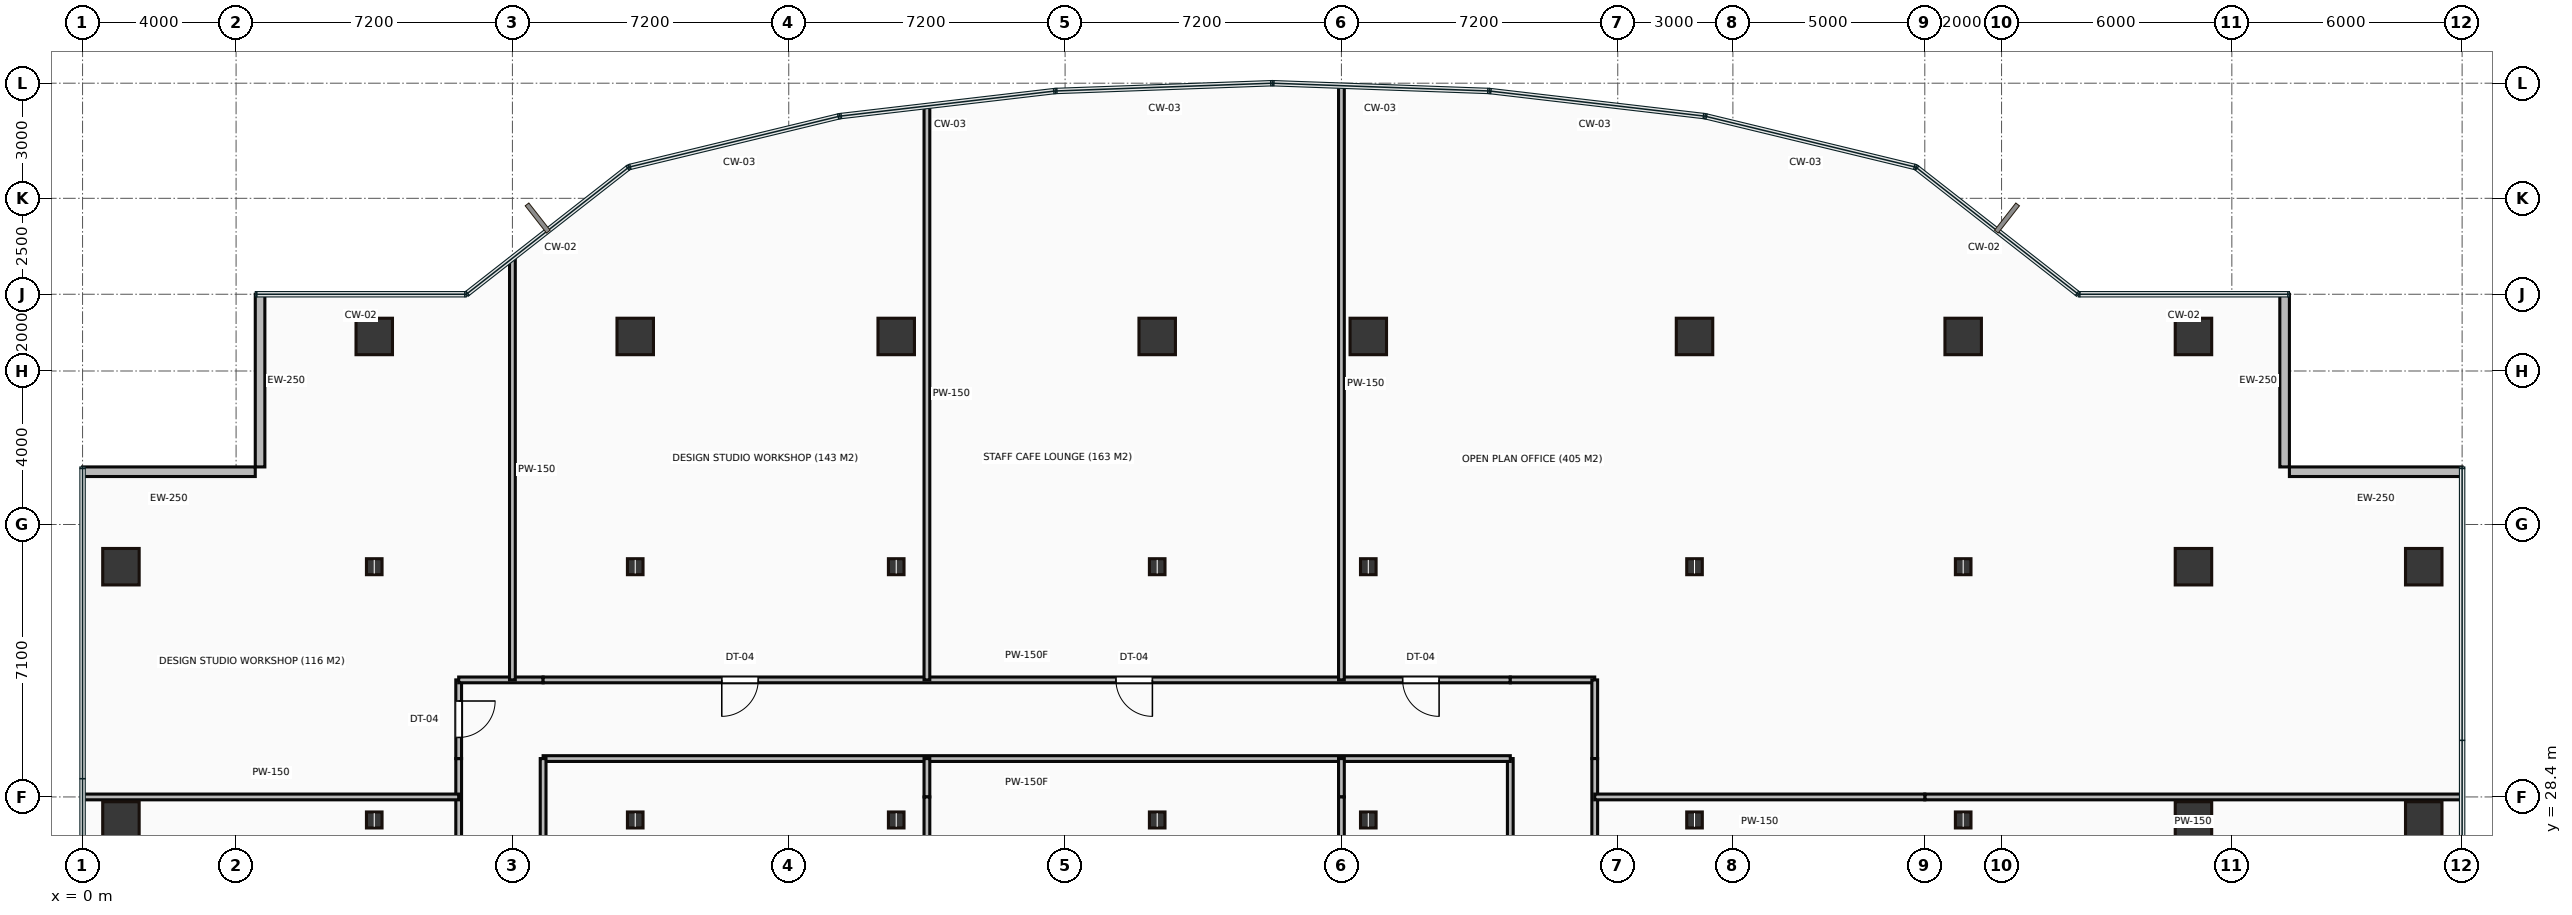
"""IFC4 building model, lengths in metres.
Left out: names, types, materials, properties, quantities, classifications, styles, units other than length and angle.
Written with IfcOpenShell. Run it as: python <this file> out.ifc"""

import sys

from ifc_helpers import new_model, si_unit, direction, frame, frame_2d, origin, origin_2d, place, context, subcontext, project, spatial, rectangle, hollow_rectangle, i_section, extrude, source, transform, mapped, element, fill, save


model = new_model("IFC4")
c1 = context("Model", 3, precision=1e-05, world=origin(), true_north=direction((0.0, 1.0)))
c2 = subcontext(c1, "Body", "Model", "MODEL_VIEW")
j1 = project(units=[si_unit("LENGTHUNIT", "METRE"), si_unit("PLANEANGLEUNIT", "RADIAN")], contexts=[c1])
p1 = place(None, origin())
s1 = spatial("IfcSite", under=j1, at=p1, CompositionType="ELEMENT")
p2 = place(p1, origin())
s2 = spatial("IfcBuilding", under=s1, at=p2, CompositionType="ELEMENT")
p3 = place(p2, frame((0.0, 0.0, 54.4)))
s3 = spatial("IfcBuildingStorey", under=s2, at=p3, CompositionType="ELEMENT", Elevation=54.4)
m1 = source(origin(), c2, "Body", "SweptSolid", [
    extrude(hollow_rectangle(XDim=0.95, YDim=0.95, WallThickness=0.045, at=origin_2d()), origin(), (0.0, 0.0, 1.0), 3.65),
])
for number, where, z_axis, x_axis in (
    (1, (1.0, 27.8, 0.0), (0.0, 0.0, 1.0), (1.0, 0.0, 0.0)),
    (2, (1.0, 34.4, 0.0), (0.0, 0.0, 1.0), (1.0, 0.0, 0.0)),
):
    element("IfcColumn", number, at=place(p3, frame(where, z_axis=z_axis, x_axis=x_axis)), inside=s3, PredefinedType="COLUMN", context=c2, shape_type="MappedRepresentation", body=[
        mapped(m1, transform((0.0, 0.0, 0.0))),
    ])
m2 = source(origin(), c2, "Body", "SweptSolid", [
    extrude(i_section(OverallWidth=0.406, OverallDepth=0.416, WebThickness=0.03, FlangeThickness=0.048, at=origin_2d()), origin(), (0.0, 0.0, 1.0), 3.65),
])
for number, where, z_axis, x_axis in (
    (3, (7.6, 27.8, 0.0), (0.0, 0.0, 1.0), (1.0, 0.0, 0.0)),
    (4, (7.6, 34.4, 0.0), (0.0, 0.0, 1.0), (1.0, 0.0, 0.0)),
):
    element("IfcColumn", number, at=place(p3, frame(where, z_axis=z_axis, x_axis=x_axis)), inside=s3, PredefinedType="COLUMN", context=c2, shape_type="MappedRepresentation", body=[
        mapped(m2, transform((0.0, 0.0, 0.0))),
    ])
p4 = place(p3, frame((7.6, 40.4, 0.0), z_axis=(0.0, 0.0, 1.0), x_axis=(1.0, 0.0, 0.0)))
e5 = element("IfcColumn", 5, at=p4, inside=s3, PredefinedType="COLUMN", context=c2, shape_type="MappedRepresentation", body=[
    mapped(m1, transform((0.0, 0.0, 0.0))),
])
for number, where, z_axis, x_axis in (
    (6, (14.4, 27.8, 0.0), (0.0, 0.0, 1.0), (1.0, 0.0, 0.0)),
    (7, (14.4, 34.4, 0.0), (0.0, 0.0, 1.0), (1.0, 0.0, 0.0)),
):
    element("IfcColumn", number, at=place(p3, frame(where, z_axis=z_axis, x_axis=x_axis)), inside=s3, PredefinedType="COLUMN", context=c2, shape_type="MappedRepresentation", body=[
        mapped(m2, transform((0.0, 0.0, 0.0))),
    ])
p5 = place(p3, frame((14.4, 40.4, 0.0), z_axis=(0.0, 0.0, 1.0), x_axis=(1.0, 0.0, 0.0)))
e8 = element("IfcColumn", 8, at=p5, inside=s3, PredefinedType="COLUMN", context=c2, shape_type="MappedRepresentation", body=[
    mapped(m1, transform((0.0, 0.0, 0.0))),
])
for number, where, z_axis, x_axis in (
    (9, (21.2, 27.8, 0.0), (0.0, 0.0, 1.0), (1.0, 0.0, 0.0)),
    (10, (21.2, 34.4, 0.0), (0.0, 0.0, 1.0), (1.0, 0.0, 0.0)),
):
    element("IfcColumn", number, at=place(p3, frame(where, z_axis=z_axis, x_axis=x_axis)), inside=s3, PredefinedType="COLUMN", context=c2, shape_type="MappedRepresentation", body=[
        mapped(m2, transform((0.0, 0.0, 0.0))),
    ])
p6 = place(p3, frame((21.2, 40.4, 0.0), z_axis=(0.0, 0.0, 1.0), x_axis=(1.0, 0.0, 0.0)))
e11 = element("IfcColumn", 11, at=p6, inside=s3, PredefinedType="COLUMN", context=c2, shape_type="MappedRepresentation", body=[
    mapped(m1, transform((0.0, 0.0, 0.0))),
])
for number, where, z_axis, x_axis in (
    (12, (28.0, 27.8, 0.0), (0.0, 0.0, 1.0), (1.0, 0.0, 0.0)),
    (13, (28.0, 34.4, 0.0), (0.0, 0.0, 1.0), (1.0, 0.0, 0.0)),
):
    element("IfcColumn", number, at=place(p3, frame(where, z_axis=z_axis, x_axis=x_axis)), inside=s3, PredefinedType="COLUMN", context=c2, shape_type="MappedRepresentation", body=[
        mapped(m2, transform((0.0, 0.0, 0.0))),
    ])
p7 = place(p3, frame((28.0, 40.4, 0.0), z_axis=(0.0, 0.0, 1.0), x_axis=(1.0, 0.0, 0.0)))
e14 = element("IfcColumn", 14, at=p7, inside=s3, PredefinedType="COLUMN", context=c2, shape_type="MappedRepresentation", body=[
    mapped(m1, transform((0.0, 0.0, 0.0))),
])
for number, where, z_axis, x_axis in (
    (15, (33.5, 27.8, 0.0), (0.0, 0.0, 1.0), (1.0, 0.0, 0.0)),
    (16, (33.5, 34.4, 0.0), (0.0, 0.0, 1.0), (1.0, 0.0, 0.0)),
):
    element("IfcColumn", number, at=place(p3, frame(where, z_axis=z_axis, x_axis=x_axis)), inside=s3, PredefinedType="COLUMN", context=c2, shape_type="MappedRepresentation", body=[
        mapped(m2, transform((0.0, 0.0, 0.0))),
    ])
p8 = place(p3, frame((33.5, 40.4, 0.0), z_axis=(0.0, 0.0, 1.0), x_axis=(1.0, 0.0, 0.0)))
e17 = element("IfcColumn", 17, at=p8, inside=s3, PredefinedType="COLUMN", context=c2, shape_type="MappedRepresentation", body=[
    mapped(m1, transform((0.0, 0.0, 0.0))),
])
for number, where, z_axis, x_axis in (
    (18, (42.0, 27.8, 0.0), (0.0, 0.0, 1.0), (1.0, 0.0, 0.0)),
    (19, (42.0, 34.4, 0.0), (0.0, 0.0, 1.0), (1.0, 0.0, 0.0)),
):
    element("IfcColumn", number, at=place(p3, frame(where, z_axis=z_axis, x_axis=x_axis)), inside=s3, PredefinedType="COLUMN", context=c2, shape_type="MappedRepresentation", body=[
        mapped(m2, transform((0.0, 0.0, 0.0))),
    ])
p9 = place(p3, frame((42.0, 40.4, 0.0), z_axis=(0.0, 0.0, 1.0), x_axis=(1.0, 0.0, 0.0)))
e20 = element("IfcColumn", 20, at=p9, inside=s3, PredefinedType="COLUMN", context=c2, shape_type="MappedRepresentation", body=[
    mapped(m1, transform((0.0, 0.0, 0.0))),
])
for number, where, z_axis, x_axis in (
    (21, (49.0, 27.8, 0.0), (0.0, 0.0, 1.0), (1.0, 0.0, 0.0)),
    (22, (49.0, 34.4, 0.0), (0.0, 0.0, 1.0), (1.0, 0.0, 0.0)),
):
    element("IfcColumn", number, at=place(p3, frame(where, z_axis=z_axis, x_axis=x_axis)), inside=s3, PredefinedType="COLUMN", context=c2, shape_type="MappedRepresentation", body=[
        mapped(m2, transform((0.0, 0.0, 0.0))),
    ])
for number, where, z_axis, x_axis in (
    (23, (49.0, 40.4, 0.0), (0.0, 0.0, 1.0), (1.0, 0.0, 0.0)),
    (24, (55.0, 27.8, 0.0), (0.0, 0.0, 1.0), (1.0, 0.0, 0.0)),
    (25, (55.0, 34.4, 0.0), (0.0, 0.0, 1.0), (1.0, 0.0, 0.0)),
    (26, (55.0, 40.4, 0.0), (0.0, 0.0, 1.0), (1.0, 0.0, 0.0)),
    (27, (61.0, 27.8, 0.0), (0.0, 0.0, 1.0), (1.0, 0.0, 0.0)),
    (28, (61.0, 34.4, 0.0), (0.0, 0.0, 1.0), (1.0, 0.0, 0.0)),
):
    element("IfcColumn", number, at=place(p3, frame(where, z_axis=z_axis, x_axis=x_axis)), inside=s3, PredefinedType="COLUMN", context=c2, shape_type="MappedRepresentation", body=[
        mapped(m1, transform((0.0, 0.0, 0.0))),
    ])
m3 = source(origin(), c2, "Body", "SweptSolid", [
    extrude(rectangle(XDim=4.5, YDim=0.25, at=frame_2d((2.25, 0.0))), origin(), (0.0, 0.0, 1.0), 3.4),
])
for number, where, z_axis, x_axis in (
    (29, (62.0, 36.875, 0.0), (0.0, 0.0, 1.0), (-1.0, 0.0, 0.0)),
    (30, (57.375, 37.0, 0.0), (0.0, 0.0, 1.0), (0.0, 1.0, 0.0)),
    (31, (4.625, 41.5, 0.0), (0.0, 0.0, 1.0), (0.0, -1.0, 0.0)),
    (32, (4.5, 36.875, 0.0), (0.0, 0.0, 1.0), (-1.0, 0.0, 0.0)),
):
    element("IfcWall", number, at=place(p3, frame(where, z_axis=z_axis, x_axis=x_axis)), inside=s3, PredefinedType="STANDARD", context=c2, shape_type="MappedRepresentation", body=[
        mapped(m3, transform((0.0, 0.0, 0.0))),
    ])
m4 = source(origin(), c2, "Body", "SweptSolid", [
    extrude(rectangle(XDim=13.15, YDim=0.15, at=frame_2d((6.575, 0.0))), origin(), (0.0, 0.0, 1.0), 3.4),
])
p10 = place(p3, frame((9.8, 16.25, 0.0), z_axis=(0.0, 0.0, 1.0), x_axis=(0.0, 1.0, 0.0)))
e33 = element("IfcWall", 33, at=p10, inside=s3, PredefinedType="PARTITIONING", context=c2, shape_type="MappedRepresentation", body=[
    mapped(m4, transform((0.0, 0.0, 0.0))),
])
p11 = place(p10, frame((5.73, 0.0, 0.0)))
e34 = element("IfcOpeningElement", 34, at=p11, cuts=e33, PredefinedType="OPENING", context=c2, shape_type="SweptSolid", body=[
    extrude(rectangle(XDim=0.95, YDim=2.15, at=frame_2d((0.475, 1.075))), frame((0.0, 0.085, 0.0), z_axis=(0.0, -1.0, 0.0), x_axis=(1.0, 0.0, 0.0)), (0.0, 0.0, 1.0), 0.17),
])
m5 = source(origin(), c2, "Body", "SweptSolid", [
    extrude(rectangle(XDim=2.05, YDim=0.15, at=frame_2d((1.025, 0.0))), origin(), (0.0, 0.0, 1.0), 3.4),
])
p12 = place(p3, frame((9.8, 29.4, 0.0), z_axis=(0.0, 0.0, 1.0), x_axis=(0.0, 1.0, 0.0)))
e35 = element("IfcWall", 35, at=p12, inside=s3, PredefinedType="PARTITIONING", context=c2, shape_type="MappedRepresentation", body=[
    mapped(m5, transform((0.0, 0.0, 0.0))),
])
p13 = place(p12, frame((0.55, 0.0, 0.0)))
e36 = element("IfcOpeningElement", 36, at=p13, cuts=e35, PredefinedType="OPENING", context=c2, shape_type="SweptSolid", body=[
    extrude(rectangle(XDim=0.95, YDim=2.15, at=frame_2d((0.475, 1.075))), frame((0.0, 0.085, 0.0), z_axis=(0.0, -1.0, 0.0), x_axis=(1.0, 0.0, 0.0)), (0.0, 0.0, 1.0), 0.17),
])
m6 = source(origin(), c2, "Body", "SweptSolid", [
    extrude(rectangle(XDim=2.2, YDim=0.15, at=frame_2d((1.1, 0.0))), origin(), (0.0, 0.0, 1.0), 3.4),
])
p14 = place(p3, frame((9.8, 31.45, 0.0), z_axis=(0.0, 0.0, 1.0), x_axis=(1.0, 0.0, 0.0)))
e37 = element("IfcWall", 37, at=p14, inside=s3, PredefinedType="PARTITIONING", context=c2, shape_type="MappedRepresentation", body=[
    mapped(m6, transform((0.0, 0.0, 0.0))),
])
m7 = source(origin(), c2, "Body", "SweptSolid", [
    extrude(rectangle(XDim=25.2, YDim=0.15, at=frame_2d((12.6, 0.0))), origin(), (0.0, 0.0, 1.0), 3.4),
])
p15 = place(p3, frame((12.0, 31.45, 0.0), z_axis=(0.0, 0.0, 1.0), x_axis=(1.0, 0.0, 0.0)))
e38 = element("IfcWall", 38, at=p15, inside=s3, PredefinedType="PARTITIONING", context=c2, shape_type="MappedRepresentation", body=[
    mapped(m7, transform((0.0, 0.0, 0.0))),
])
p16 = place(p15, frame((4.655, 0.0, 0.0)))
e39 = element("IfcOpeningElement", 39, at=p16, cuts=e38, PredefinedType="OPENING", context=c2, shape_type="SweptSolid", body=[
    extrude(rectangle(XDim=0.95, YDim=2.15, at=frame_2d((0.475, 1.075))), frame((0.0, 0.085, 0.0), z_axis=(0.0, -1.0, 0.0), x_axis=(1.0, 0.0, 0.0)), (0.0, 0.0, 1.0), 0.17),
])
p17 = place(p15, frame((14.925, 0.0, 0.0)))
e40 = element("IfcOpeningElement", 40, at=p17, cuts=e38, PredefinedType="OPENING", context=c2, shape_type="SweptSolid", body=[
    extrude(rectangle(XDim=0.95, YDim=2.15, at=frame_2d((0.475, 1.075))), frame((0.0, 0.085, 0.0), z_axis=(0.0, -1.0, 0.0), x_axis=(1.0, 0.0, 0.0)), (0.0, 0.0, 1.0), 0.17),
])
p18 = place(p15, frame((22.395, 0.0, 0.0)))
e41 = element("IfcOpeningElement", 41, at=p18, cuts=e38, PredefinedType="OPENING", context=c2, shape_type="SweptSolid", body=[
    extrude(rectangle(XDim=0.95, YDim=2.15, at=frame_2d((0.475, 1.075))), frame((0.0, 0.085, 0.0), z_axis=(0.0, -1.0, 0.0), x_axis=(1.0, 0.0, 0.0)), (0.0, 0.0, 1.0), 0.17),
])
p19 = place(p3, frame((37.2, 31.45, 0.0), z_axis=(0.0, 0.0, 1.0), x_axis=(1.0, 0.0, 0.0)))
e42 = element("IfcWall", 42, at=p19, inside=s3, PredefinedType="PARTITIONING", context=c2, shape_type="MappedRepresentation", body=[
    mapped(m6, transform((0.0, 0.0, 0.0))),
])
p20 = place(p3, frame((39.4, 31.45, 0.0), z_axis=(0.0, 0.0, 1.0), x_axis=(0.0, -1.0, 0.0)))
e43 = element("IfcWall", 43, at=p20, inside=s3, PredefinedType="PARTITIONING", context=c2, shape_type="MappedRepresentation", body=[
    mapped(m5, transform((0.0, 0.0, 0.0))),
])
p21 = place(p3, frame((39.4, 29.4, 0.0), z_axis=(0.0, 0.0, 1.0), x_axis=(0.0, -1.0, 0.0)))
e44 = element("IfcWall", 44, at=p21, inside=s3, PredefinedType="PARTITIONING", context=c2, shape_type="MappedRepresentation", body=[
    mapped(m4, transform((0.0, 0.0, 0.0))),
])
p22 = place(p21, frame((6.47, 0.0, 0.0)))
e45 = element("IfcOpeningElement", 45, at=p22, cuts=e44, PredefinedType="OPENING", context=c2, shape_type="SweptSolid", body=[
    extrude(rectangle(XDim=0.95, YDim=2.15, at=frame_2d((0.475, 1.075))), frame((0.0, 0.085, 0.0), z_axis=(0.0, -1.0, 0.0), x_axis=(1.0, 0.0, 0.0)), (0.0, 0.0, 1.0), 0.17),
])
p23 = place(p3, frame((37.2, 16.25, 0.0), z_axis=(0.0, 0.0, 1.0), x_axis=(0.0, 1.0, 0.0)))
e46 = element("IfcWall", 46, at=p23, inside=s3, PredefinedType="PARTITIONING", context=c2, shape_type="MappedRepresentation", body=[
    mapped(m4, transform((0.0, 0.0, 0.0))),
])
p24 = place(p23, frame((6.1, 0.0, 0.0)))
e47 = element("IfcOpeningElement", 47, at=p24, cuts=e46, PredefinedType="OPENING", context=c2, shape_type="SweptSolid", body=[
    extrude(rectangle(XDim=0.95, YDim=2.15, at=frame_2d((0.475, 1.075))), frame((0.0, 0.085, 0.0), z_axis=(0.0, -1.0, 0.0), x_axis=(1.0, 0.0, 0.0)), (0.0, 0.0, 1.0), 0.17),
])
p25 = place(p3, frame((37.2, 29.4, 0.0), z_axis=(0.0, 0.0, 1.0), x_axis=(-1.0, 0.0, 0.0)))
e48 = element("IfcWall", 48, at=p25, inside=s3, PredefinedType="PARTITIONING", context=c2, shape_type="MappedRepresentation", body=[
    mapped(m7, transform((0.0, 0.0, 0.0))),
])
p26 = place(p3, frame((12.0, 29.4, 0.0), z_axis=(0.0, 0.0, 1.0), x_axis=(0.0, -1.0, 0.0)))
e49 = element("IfcWall", 49, at=p26, inside=s3, PredefinedType="PARTITIONING", context=c2, shape_type="MappedRepresentation", body=[
    mapped(m4, transform((0.0, 0.0, 0.0))),
])
p27 = place(p26, frame((6.1, 0.0, 0.0)))
e50 = element("IfcOpeningElement", 50, at=p27, cuts=e49, PredefinedType="OPENING", context=c2, shape_type="SweptSolid", body=[
    extrude(rectangle(XDim=0.95, YDim=2.15, at=frame_2d((0.475, 1.075))), frame((0.0, 0.085, 0.0), z_axis=(0.0, -1.0, 0.0), x_axis=(1.0, 0.0, 0.0)), (0.0, 0.0, 1.0), 0.17),
])
m8 = source(origin(), c2, "Body", "SweptSolid", [
    extrude(rectangle(XDim=9.78, YDim=0.15, at=frame_2d((4.89, 0.0))), origin(), (0.0, 0.0, 1.0), 3.4),
])
p28 = place(p3, frame((0.02, 28.4, 0.0), z_axis=(0.0, 0.0, 1.0), x_axis=(1.0, 0.0, 0.0)))
e51 = element("IfcWall", 51, at=p28, inside=s3, PredefinedType="PARTITIONING", context=c2, shape_type="MappedRepresentation", body=[
    mapped(m8, transform((0.0, 0.0, 0.0))),
])
m9 = source(origin(), c2, "Body", "SweptSolid", [
    extrude(rectangle(XDim=10.963, YDim=0.15, at=frame_2d((5.482, 0.0))), origin(), (0.0, 0.0, 1.0), 3.4),
])
p29 = place(p3, frame((11.2, 42.413, 0.0), z_axis=(0.0, 0.0, 1.0), x_axis=(0.0, -1.0, 0.0)))
e52 = element("IfcWall", 52, at=p29, inside=s3, PredefinedType="PARTITIONING", context=c2, shape_type="MappedRepresentation", body=[
    mapped(m9, transform((0.0, 0.0, 0.0))),
])
m10 = source(origin(), c2, "Body", "SweptSolid", [
    extrude(rectangle(XDim=1.0, YDim=0.15, at=frame_2d((0.5, 0.0))), origin(), (0.0, 0.0, 1.0), 3.4),
])
p30 = place(p3, frame((22.0, 29.4, 0.0), z_axis=(0.0, 0.0, 1.0), x_axis=(0.0, -1.0, 0.0)))
e53 = element("IfcWall", 53, at=p30, inside=s3, PredefinedType="PARTITIONING", context=c2, shape_type="MappedRepresentation", body=[
    mapped(m10, transform((0.0, 0.0, 0.0))),
])
m11 = source(origin(), c2, "Body", "SweptSolid", [
    extrude(rectangle(XDim=12.15, YDim=0.15, at=frame_2d((6.075, 0.0))), origin(), (0.0, 0.0, 1.0), 3.4),
])
p31 = place(p3, frame((22.0, 28.4, 0.0), z_axis=(0.0, 0.0, 1.0), x_axis=(0.0, -1.0, 0.0)))
e54 = element("IfcWall", 54, at=p31, inside=s3, PredefinedType="PARTITIONING", context=c2, shape_type="MappedRepresentation", body=[
    mapped(m11, transform((0.0, 0.0, 0.0))),
])
m12 = source(origin(), c2, "Body", "SweptSolid", [
    extrude(rectangle(XDim=14.936, YDim=0.15, at=frame_2d((7.468, 0.0))), origin(), (0.0, 0.0, 1.0), 3.4),
])
p32 = place(p3, frame((22.0, 46.386, 0.0), z_axis=(0.0, 0.0, 1.0), x_axis=(0.0, -1.0, 0.0)))
e55 = element("IfcWall", 55, at=p32, inside=s3, PredefinedType="PARTITIONING", context=c2, shape_type="MappedRepresentation", body=[
    mapped(m12, transform((0.0, 0.0, 0.0))),
])
p33 = place(p3, frame((32.8, 29.4, 0.0), z_axis=(0.0, 0.0, 1.0), x_axis=(0.0, -1.0, 0.0)))
e56 = element("IfcWall", 56, at=p33, inside=s3, PredefinedType="PARTITIONING", context=c2, shape_type="MappedRepresentation", body=[
    mapped(m10, transform((0.0, 0.0, 0.0))),
])
p34 = place(p3, frame((32.8, 28.4, 0.0), z_axis=(0.0, 0.0, 1.0), x_axis=(0.0, -1.0, 0.0)))
e57 = element("IfcWall", 57, at=p34, inside=s3, PredefinedType="PARTITIONING", context=c2, shape_type="MappedRepresentation", body=[
    mapped(m11, transform((0.0, 0.0, 0.0))),
])
m13 = source(origin(), c2, "Body", "SweptSolid", [
    extrude(rectangle(XDim=15.465, YDim=0.15, at=frame_2d((7.733, 0.0))), origin(), (0.0, 0.0, 1.0), 3.4),
])
p35 = place(p3, frame((32.8, 46.915, 0.0), z_axis=(0.0, 0.0, 1.0), x_axis=(0.0, -1.0, 0.0)))
e58 = element("IfcWall", 58, at=p35, inside=s3, PredefinedType="PARTITIONING", context=c2, shape_type="MappedRepresentation", body=[
    mapped(m13, transform((0.0, 0.0, 0.0))),
])
m14 = source(origin(), c2, "Body", "SweptSolid", [
    extrude(rectangle(XDim=13.98, YDim=0.15, at=frame_2d((6.99, 0.0))), origin(), (0.0, 0.0, 1.0), 3.4),
])
p36 = place(p3, frame((61.98, 28.4, 0.0), z_axis=(0.0, 0.0, 1.0), x_axis=(-1.0, 0.0, 0.0)))
e59 = element("IfcWall", 59, at=p36, inside=s3, PredefinedType="PARTITIONING", context=c2, shape_type="MappedRepresentation", body=[
    mapped(m14, transform((0.0, 0.0, 0.0))),
])
m15 = source(origin(), c2, "Body", "SweptSolid", [
    extrude(rectangle(XDim=8.6, YDim=0.15, at=frame_2d((4.3, 0.0))), origin(), (0.0, 0.0, 1.0), 3.4),
])
p37 = place(p3, frame((48.0, 28.4, 0.0), z_axis=(0.0, 0.0, 1.0), x_axis=(-1.0, 0.0, 0.0)))
e60 = element("IfcWall", 60, at=p37, inside=s3, PredefinedType="PARTITIONING", context=c2, shape_type="MappedRepresentation", body=[
    mapped(m15, transform((0.0, 0.0, 0.0))),
])
m16 = source(origin(), c2, "Body", "SweptSolid", [
    extrude(rectangle(XDim=0.95, YDim=2.15, at=frame_2d((0.475, 1.075))), frame((0.0, 0.025, 0.0), z_axis=(0.0, -1.0, 0.0), x_axis=(1.0, 0.0, 0.0)), (0.0, 0.0, 1.0), 0.05),
])
p38 = place(p13, origin())
e61 = element("IfcDoor", 61, at=p38, inside=s3, OperationType="SINGLE_SWING_RIGHT", PredefinedType="DOOR", context=c2, shape_type="MappedRepresentation", body=[
    mapped(m16, transform((0.0, 0.0, 0.0))),
])
fill(e36, e61)
p39 = place(p16, origin())
e62 = element("IfcDoor", 62, at=p39, inside=s3, OperationType="SINGLE_SWING_LEFT", PredefinedType="DOOR", context=c2, shape_type="MappedRepresentation", body=[
    mapped(m16, transform((0.0, 0.0, 0.0))),
])
fill(e39, e62)
p40 = place(p17, origin())
e63 = element("IfcDoor", 63, at=p40, inside=s3, OperationType="SINGLE_SWING_RIGHT", PredefinedType="DOOR", context=c2, shape_type="MappedRepresentation", body=[
    mapped(m16, transform((0.0, 0.0, 0.0))),
])
fill(e40, e63)
p41 = place(p18, origin())
e64 = element("IfcDoor", 64, at=p41, inside=s3, OperationType="SINGLE_SWING_RIGHT", PredefinedType="DOOR", context=c2, shape_type="MappedRepresentation", body=[
    mapped(m16, transform((0.0, 0.0, 0.0))),
])
fill(e41, e64)
save(model, sys.argv[1])
